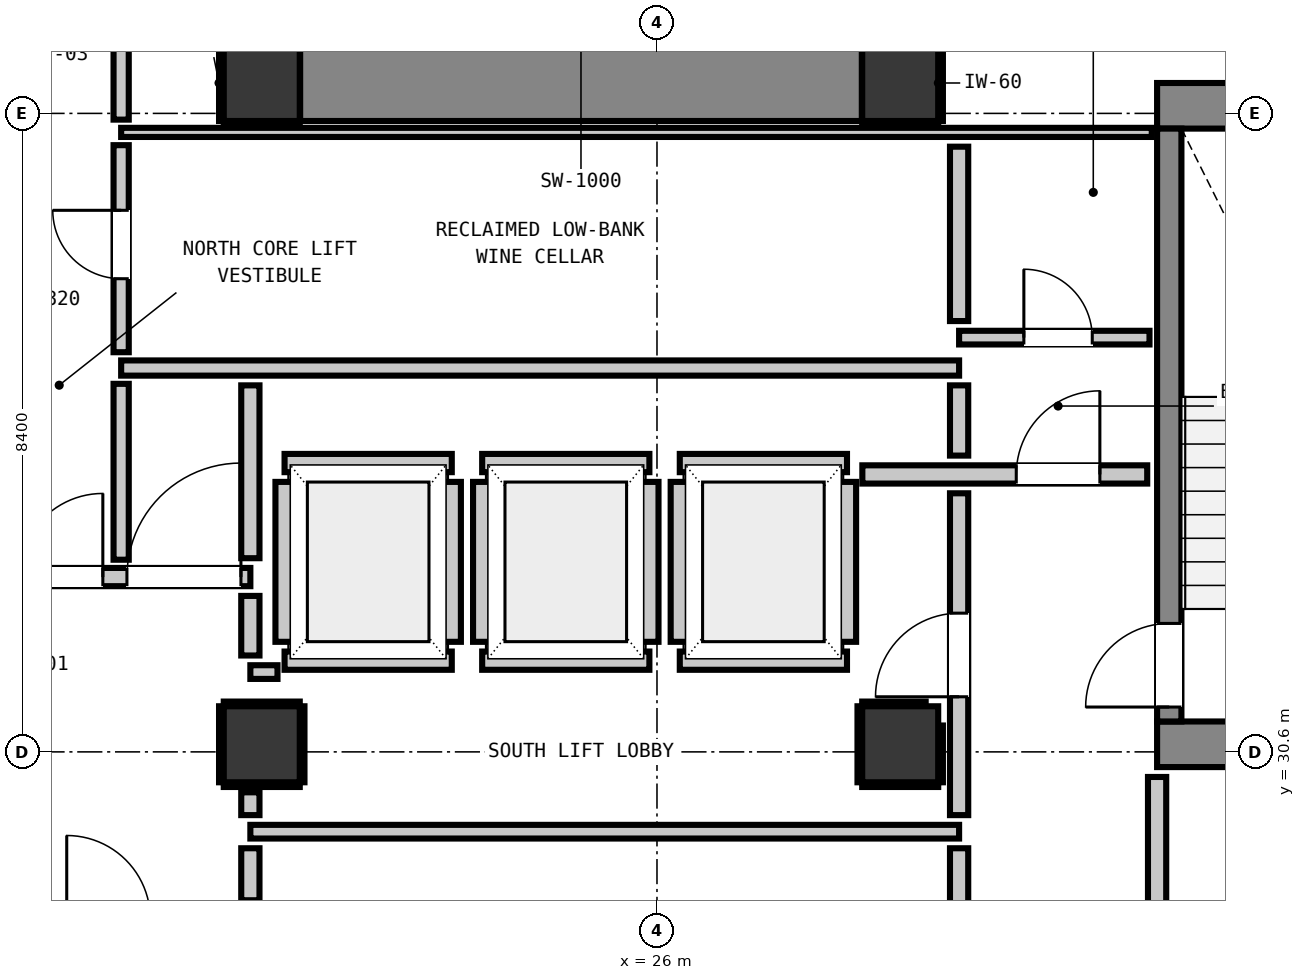
"""IFC4 building model, lengths in metres.
Left out: names, types, materials, properties, quantities, classifications, styles, units other than length and angle.
Written with IfcOpenShell. Run it as: python <this file> out.ifc"""

import sys

from ifc_helpers import new_model, si_unit, direction, frame, frame_2d, origin, origin_2d, place, context, subcontext, project, spatial, rectangle, extrude, element, fill, save


model = new_model("IFC4")
c1 = context("Model", 3, precision=1e-05, world=origin(), true_north=direction((0.0, 1.0)))
c2 = subcontext(c1, "Body", "Model", "MODEL_VIEW")
j1 = project(units=[si_unit("LENGTHUNIT", "METRE"), si_unit("PLANEANGLEUNIT", "RADIAN")], contexts=[c1])
p1 = place(None, origin())
s1 = spatial("IfcSite", under=j1, at=p1, CompositionType="ELEMENT")
p2 = place(p1, origin())
s2 = spatial("IfcBuilding", under=s1, at=p2, CompositionType="ELEMENT")
p3 = place(p2, frame((0.0, 0.0, 92.8)))
s3 = spatial("IfcBuildingStorey", under=s2, at=p3, CompositionType="ELEMENT", Elevation=92.8)
for number, where, z_axis, x_axis in (
    (1, (20.8, 39.4, 0.0), (0.0, 0.0, 1.0), (1.0, 0.0, 0.0)),
    (2, (29.2, 39.4, 0.0), (0.0, 0.0, 1.0), (1.0, 0.0, 0.0)),
):
    element("IfcColumn", number, at=place(p3, frame(where, z_axis=z_axis, x_axis=x_axis)), inside=s3, PredefinedType="COLUMN", context=c2, shape_type="SweptSolid", body=[
        extrude(rectangle(XDim=1.0, YDim=1.0, at=origin_2d()), origin(), (0.0, 0.0, 1.0), 3.32),
    ])
p4 = place(p3, frame((32.58, 39.1, 0.0), z_axis=(0.0, 0.0, 1.0), x_axis=(1.0, 0.0, 0.0)))
e3 = element("IfcWall", 3, at=p4, inside=s3, PredefinedType="SHEAR", context=c2, shape_type="SweptSolid", body=[
    extrude(rectangle(XDim=4.08, YDim=0.6, at=frame_2d((2.04, 0.0))), origin(), (0.0, 0.0, 1.0), 3.32),
])
p5 = place(p3, frame((32.58, 30.7, 0.0), z_axis=(0.0, 0.0, 1.0), x_axis=(1.0, 0.0, 0.0)))
e4 = element("IfcWall", 4, at=p5, inside=s3, PredefinedType="SHEAR", context=c2, shape_type="SweptSolid", body=[
    extrude(rectangle(XDim=3.415, YDim=0.6, at=frame_2d((1.708, 0.0))), origin(), (0.0, 0.0, 1.0), 3.32),
])
p6 = place(p3, frame((21.305, 39.4, 0.0), z_axis=(0.0, 0.0, 1.0), x_axis=(1.0, 0.0, 0.0)))
e5 = element("IfcWall", 5, at=p6, inside=s3, PredefinedType="SHEAR", context=c2, shape_type="SweptSolid", body=[
    extrude(rectangle(XDim=7.39, YDim=1.0, at=frame_2d((3.695, 0.0))), origin(), (0.0, 0.0, 1.0), 3.32),
])
p7 = place(p3, frame((32.74, 31.0, 0.0), z_axis=(0.0, 0.0, 1.0), x_axis=(0.0, 1.0, 0.0)))
e6 = element("IfcWall", 6, at=p7, inside=s3, PredefinedType="SHEAR", context=c2, shape_type="SweptSolid", body=[
    extrude(rectangle(XDim=7.8, YDim=0.32, at=frame_2d((3.9, 0.0))), origin(), (0.0, 0.0, 1.0), 3.32),
])
p8 = place(p7, frame((0.19, 0.0, 0.0)))
e7 = element("IfcOpeningElement", 7, at=p8, cuts=e6, PredefinedType="OPENING", context=c2, shape_type="SweptSolid", body=[
    extrude(rectangle(XDim=1.1, YDim=2.15, at=frame_2d((0.55, 1.075))), frame((0.0, 0.17, 0.0), z_axis=(0.0, -1.0, 0.0), x_axis=(1.0, 0.0, 0.0)), (0.0, 0.0, 1.0), 0.34),
])
for number, where, z_axis, x_axis in (
    (8, (20.8, 30.7, 0.0), (0.0, 0.0, 1.0), (1.0, 0.0, 0.0)),
    (9, (29.2, 30.7, 0.0), (0.0, 0.0, 1.0), (1.0, 0.0, 0.0)),
):
    element("IfcColumn", number, at=place(p3, frame(where, z_axis=z_axis, x_axis=x_axis)), inside=s3, PredefinedType="COLUMN", context=c2, shape_type="SweptSolid", body=[
        extrude(rectangle(XDim=1.0, YDim=1.0, at=origin_2d()), origin(), (0.0, 0.0, 1.0), 3.32),
    ])
for number, where, z_axis, x_axis in (
    (10, (21.1, 31.8, 0.0), (0.0, 0.0, 1.0), (1.0, 0.0, 0.0)),
    (11, (21.1, 34.4, 0.0), (0.0, 0.0, 1.0), (1.0, 0.0, 0.0)),
):
    element("IfcWall", number, at=place(p3, frame(where, z_axis=z_axis, x_axis=x_axis)), inside=s3, PredefinedType="PARTITIONING", context=c2, shape_type="SweptSolid", body=[
        extrude(rectangle(XDim=2.2, YDim=0.24, at=frame_2d((1.1, 0.0))), origin(), (0.0, 0.0, 1.0), 3.06),
    ])
p9 = place(p3, frame((21.1, 32.048, 0.0), z_axis=(0.0, 0.0, 1.0), x_axis=(0.0, 1.0, 0.0)))
e12 = element("IfcWall", 12, at=p9, inside=s3, PredefinedType="PARTITIONING", context=c2, shape_type="SweptSolid", body=[
    extrude(rectangle(XDim=2.104, YDim=0.24, at=frame_2d((1.052, 0.0))), origin(), (0.0, 0.0, 1.0), 2.295),
])
p10 = place(p3, frame((23.3, 32.048, 0.0), z_axis=(0.0, 0.0, 1.0), x_axis=(0.0, 1.0, 0.0)))
e13 = element("IfcWall", 13, at=p10, inside=s3, PredefinedType="PARTITIONING", context=c2, shape_type="SweptSolid", body=[
    extrude(rectangle(XDim=2.104, YDim=0.24, at=frame_2d((1.052, 0.0))), origin(), (0.0, 0.0, 1.0), 3.06),
])
for number, where, z_axis, x_axis in (
    (14, (23.7, 31.8, 0.0), (0.0, 0.0, 1.0), (1.0, 0.0, 0.0)),
    (15, (23.7, 34.4, 0.0), (0.0, 0.0, 1.0), (1.0, 0.0, 0.0)),
):
    element("IfcWall", number, at=place(p3, frame(where, z_axis=z_axis, x_axis=x_axis)), inside=s3, PredefinedType="PARTITIONING", context=c2, shape_type="SweptSolid", body=[
        extrude(rectangle(XDim=2.2, YDim=0.24, at=frame_2d((1.1, 0.0))), origin(), (0.0, 0.0, 1.0), 3.06),
    ])
for number, where, z_axis, x_axis in (
    (16, (23.7, 32.048, 0.0), (0.0, 0.0, 1.0), (0.0, 1.0, 0.0)),
    (17, (25.9, 32.048, 0.0), (0.0, 0.0, 1.0), (0.0, 1.0, 0.0)),
):
    element("IfcWall", number, at=place(p3, frame(where, z_axis=z_axis, x_axis=x_axis)), inside=s3, PredefinedType="PARTITIONING", context=c2, shape_type="SweptSolid", body=[
        extrude(rectangle(XDim=2.104, YDim=0.24, at=frame_2d((1.052, 0.0))), origin(), (0.0, 0.0, 1.0), 3.06),
    ])
for number, where, z_axis, x_axis in (
    (18, (26.3, 31.8, 0.0), (0.0, 0.0, 1.0), (1.0, 0.0, 0.0)),
    (19, (26.3, 34.4, 0.0), (0.0, 0.0, 1.0), (1.0, 0.0, 0.0)),
):
    element("IfcWall", number, at=place(p3, frame(where, z_axis=z_axis, x_axis=x_axis)), inside=s3, PredefinedType="PARTITIONING", context=c2, shape_type="SweptSolid", body=[
        extrude(rectangle(XDim=2.2, YDim=0.24, at=frame_2d((1.1, 0.0))), origin(), (0.0, 0.0, 1.0), 3.06),
    ])
for number, where, z_axis, x_axis in (
    (20, (26.3, 32.048, 0.0), (0.0, 0.0, 1.0), (0.0, 1.0, 0.0)),
    (21, (28.5, 32.048, 0.0), (0.0, 0.0, 1.0), (0.0, 1.0, 0.0)),
):
    element("IfcWall", number, at=place(p3, frame(where, z_axis=z_axis, x_axis=x_axis)), inside=s3, PredefinedType="PARTITIONING", context=c2, shape_type="SweptSolid", body=[
        extrude(rectangle(XDim=2.104, YDim=0.24, at=frame_2d((1.052, 0.0))), origin(), (0.0, 0.0, 1.0), 3.06),
    ])
p11 = place(p3, frame((17.45, 32.9, 0.0), z_axis=(0.0, 0.0, 1.0), x_axis=(1.0, 0.0, 0.0)))
e22 = element("IfcWall", 22, at=p11, inside=s3, PredefinedType="PARTITIONING", context=c2, shape_type="SweptSolid", body=[
    extrude(rectangle(XDim=3.2, YDim=0.24, at=frame_2d((1.6, 0.0))), origin(), (0.0, 0.0, 1.0), 3.06),
])
p12 = place(p11, frame((0.159, 0.0, 0.0)))
e23 = element("IfcOpeningElement", 23, at=p12, cuts=e22, PredefinedType="OPENING", context=c2, shape_type="SweptSolid", body=[
    extrude(rectangle(XDim=1.1, YDim=2.15, at=frame_2d((0.55, 1.075))), frame((0.0, 0.13, 0.0), z_axis=(0.0, -1.0, 0.0), x_axis=(1.0, 0.0, 0.0)), (0.0, 0.0, 1.0), 0.26),
])
p13 = place(p11, frame((1.576, 0.0, 0.0)))
e24 = element("IfcOpeningElement", 24, at=p13, cuts=e22, PredefinedType="OPENING", context=c2, shape_type="SweptSolid", body=[
    extrude(rectangle(XDim=1.5, YDim=2.15, at=frame_2d((0.75, 1.075))), frame((0.0, 0.13, 0.0), z_axis=(0.0, -1.0, 0.0), x_axis=(1.0, 0.0, 0.0)), (0.0, 0.0, 1.0), 0.26),
])
p14 = place(p3, frame((28.702, 34.25, 0.0), z_axis=(0.0, 0.0, 1.0), x_axis=(1.0, 0.0, 0.0)))
e25 = element("IfcWall", 25, at=p14, inside=s3, PredefinedType="PARTITIONING", context=c2, shape_type="SweptSolid", body=[
    extrude(rectangle(XDim=3.748, YDim=0.24, at=frame_2d((1.874, 0.0))), origin(), (0.0, 0.0, 1.0), 3.06),
])
p15 = place(p14, frame((2.025, 0.0, 0.0)))
e26 = element("IfcOpeningElement", 26, at=p15, cuts=e25, PredefinedType="OPENING", context=c2, shape_type="SweptSolid", body=[
    extrude(rectangle(XDim=1.1, YDim=2.15, at=frame_2d((0.55, 1.075))), frame((0.0, 0.13, 0.0), z_axis=(0.0, -1.0, 0.0), x_axis=(1.0, 0.0, 0.0)), (0.0, 0.0, 1.0), 0.26),
])
p16 = place(p3, frame((18.95, 35.65, 0.0), z_axis=(0.0, 0.0, 1.0), x_axis=(1.0, 0.0, 0.0)))
e27 = element("IfcWall", 27, at=p16, inside=s3, PredefinedType="PARTITIONING", context=c2, shape_type="SweptSolid", body=[
    extrude(rectangle(XDim=11.025, YDim=0.2, at=frame_2d((5.513, 0.0))), origin(), (0.0, 0.0, 1.0), 3.06),
])
p17 = place(p3, frame((20.65, 29.55, 0.0), z_axis=(0.0, 0.0, 1.0), x_axis=(1.0, 0.0, 0.0)))
e28 = element("IfcWall", 28, at=p17, inside=s3, PredefinedType="PARTITIONING", context=c2, shape_type="SweptSolid", body=[
    extrude(rectangle(XDim=9.325, YDim=0.18, at=frame_2d((4.663, 0.0))), origin(), (0.0, 0.0, 1.0), 3.06),
])
p18 = place(p3, frame((20.65, 31.65, 0.0), z_axis=(0.0, 0.0, 1.0), x_axis=(1.0, 0.0, 0.0)))
e29 = element("IfcWall", 29, at=p18, inside=s3, PredefinedType="PARTITIONING", context=c2, shape_type="SweptSolid", body=[
    extrude(rectangle(XDim=0.357, YDim=0.18, at=frame_2d((0.179, 0.0))), origin(), (0.0, 0.0, 1.0), 3.06),
])
p19 = place(p3, frame((29.975, 36.05, 0.0), z_axis=(0.0, 0.0, 1.0), x_axis=(1.0, 0.0, 0.0)))
e30 = element("IfcWall", 30, at=p19, inside=s3, PredefinedType="PARTITIONING", context=c2, shape_type="SweptSolid", body=[
    extrude(rectangle(XDim=2.505, YDim=0.18, at=frame_2d((1.252, 0.0))), origin(), (0.0, 0.0, 1.0), 3.06),
])
p20 = place(p19, frame((0.852, 0.0, 0.0)))
e31 = element("IfcOpeningElement", 31, at=p20, cuts=e30, PredefinedType="OPENING", context=c2, shape_type="SweptSolid", body=[
    extrude(rectangle(XDim=0.9, YDim=2.1, at=frame_2d((0.45, 1.05))), frame((0.0, 0.1, 0.0), z_axis=(0.0, -1.0, 0.0), x_axis=(1.0, 0.0, 0.0)), (0.0, 0.0, 1.0), 0.2),
])
p21 = place(p3, frame((18.95, 38.75, 0.0), z_axis=(0.0, 0.0, 1.0), x_axis=(1.0, 0.0, 0.0)))
e32 = element("IfcWall", 32, at=p21, inside=s3, PredefinedType="PARTITIONING", context=c2, shape_type="SweptSolid", body=[
    extrude(rectangle(XDim=13.56, YDim=0.12, at=frame_2d((6.78, 0.0))), origin(), (0.0, 0.0, 1.0), 3.06),
])
p22 = place(p3, frame((20.65, 28.648, 0.0), z_axis=(0.0, 0.0, 1.0), x_axis=(0.0, 1.0, 0.0)))
e33 = element("IfcWall", 33, at=p22, inside=s3, PredefinedType="PARTITIONING", context=c2, shape_type="SweptSolid", body=[
    extrude(rectangle(XDim=0.684, YDim=0.24, at=frame_2d((0.342, 0.0))), origin(), (0.0, 0.0, 1.0), 2.295),
])
p23 = place(p3, frame((20.65, 29.768, 0.0), z_axis=(0.0, 0.0, 1.0), x_axis=(0.0, 1.0, 0.0)))
e34 = element("IfcWall", 34, at=p23, inside=s3, PredefinedType="PARTITIONING", context=c2, shape_type="SweptSolid", body=[
    extrude(rectangle(XDim=0.3, YDim=0.24, at=frame_2d((0.15, 0.0))), origin(), (0.0, 0.0, 1.0), 2.295),
])
p24 = place(p3, frame((20.65, 31.868, 0.0), z_axis=(0.0, 0.0, 1.0), x_axis=(0.0, 1.0, 0.0)))
e35 = element("IfcWall", 35, at=p24, inside=s3, PredefinedType="PARTITIONING", context=c2, shape_type="SweptSolid", body=[
    extrude(rectangle(XDim=0.784, YDim=0.24, at=frame_2d((0.392, 0.0))), origin(), (0.0, 0.0, 1.0), 2.295),
])
p25 = place(p3, frame((20.65, 33.148, 0.0), z_axis=(0.0, 0.0, 1.0), x_axis=(0.0, 1.0, 0.0)))
e36 = element("IfcWall", 36, at=p25, inside=s3, PredefinedType="PARTITIONING", context=c2, shape_type="SweptSolid", body=[
    extrude(rectangle(XDim=2.274, YDim=0.24, at=frame_2d((1.137, 0.0))), origin(), (0.0, 0.0, 1.0), 2.295),
])
p26 = place(p3, frame((29.975, 25.648, 0.0), z_axis=(0.0, 0.0, 1.0), x_axis=(0.0, 1.0, 0.0)))
e37 = element("IfcWall", 37, at=p26, inside=s3, PredefinedType="PARTITIONING", context=c2, shape_type="SweptSolid", body=[
    extrude(rectangle(XDim=3.684, YDim=0.24, at=frame_2d((1.842, 0.0))), origin(), (0.0, 0.0, 1.0), 3.06),
])
p27 = place(p3, frame((29.975, 29.768, 0.0), z_axis=(0.0, 0.0, 1.0), x_axis=(0.0, 1.0, 0.0)))
e38 = element("IfcWall", 38, at=p27, inside=s3, PredefinedType="PARTITIONING", context=c2, shape_type="SweptSolid", body=[
    extrude(rectangle(XDim=4.234, YDim=0.24, at=frame_2d((2.117, 0.0))), origin(), (0.0, 0.0, 1.0), 3.06),
])
p28 = place(p27, frame((1.557, 0.0, 0.0)))
e39 = element("IfcOpeningElement", 39, at=p28, cuts=e38, PredefinedType="OPENING", context=c2, shape_type="SweptSolid", body=[
    extrude(rectangle(XDim=1.1, YDim=2.15, at=frame_2d((0.55, 1.075))), frame((0.0, 0.13, 0.0), z_axis=(0.0, -1.0, 0.0), x_axis=(1.0, 0.0, 0.0)), (0.0, 0.0, 1.0), 0.26),
])
p29 = place(p3, frame((29.975, 34.498, 0.0), z_axis=(0.0, 0.0, 1.0), x_axis=(0.0, 1.0, 0.0)))
e40 = element("IfcWall", 40, at=p29, inside=s3, PredefinedType="PARTITIONING", context=c2, shape_type="SweptSolid", body=[
    extrude(rectangle(XDim=0.924, YDim=0.24, at=frame_2d((0.462, 0.0))), origin(), (0.0, 0.0, 1.0), 3.06),
])
p30 = place(p3, frame((29.975, 36.268, 0.0), z_axis=(0.0, 0.0, 1.0), x_axis=(0.0, 1.0, 0.0)))
e41 = element("IfcWall", 41, at=p30, inside=s3, PredefinedType="PARTITIONING", context=c2, shape_type="SweptSolid", body=[
    extrude(rectangle(XDim=2.294, YDim=0.24, at=frame_2d((1.147, 0.0))), origin(), (0.0, 0.0, 1.0), 3.06),
])
p31 = place(p3, frame((32.58, 25.648, 0.0), z_axis=(0.0, 0.0, 1.0), x_axis=(0.0, 1.0, 0.0)))
e42 = element("IfcWall", 42, at=p31, inside=s3, PredefinedType="PARTITIONING", context=c2, shape_type="SweptSolid", body=[
    extrude(rectangle(XDim=4.622, YDim=0.24, at=frame_2d((2.311, 0.0))), origin(), (0.0, 0.0, 1.0), 3.06),
])
p32 = place(p3, frame((18.95, 33.128, 0.0), z_axis=(0.0, 0.0, 1.0), x_axis=(0.0, 1.0, 0.0)))
e43 = element("IfcWall", 43, at=p32, inside=s3, PredefinedType="PARTITIONING", context=c2, shape_type="SweptSolid", body=[
    extrude(rectangle(XDim=2.314, YDim=0.2, at=frame_2d((1.157, 0.0))), origin(), (0.0, 0.0, 1.0), 3.06),
])
p33 = place(p3, frame((18.95, 35.858, 0.0), z_axis=(0.0, 0.0, 1.0), x_axis=(0.0, 1.0, 0.0)))
e44 = element("IfcWall", 44, at=p33, inside=s3, PredefinedType="PARTITIONING", context=c2, shape_type="SweptSolid", body=[
    extrude(rectangle(XDim=2.724, YDim=0.2, at=frame_2d((1.362, 0.0))), origin(), (0.0, 0.0, 1.0), 3.06),
])
p34 = place(p33, frame((0.967, 0.0, 0.0)))
e45 = element("IfcOpeningElement", 45, at=p34, cuts=e44, PredefinedType="OPENING", context=c2, shape_type="SweptSolid", body=[
    extrude(rectangle(XDim=0.9, YDim=2.1, at=frame_2d((0.45, 1.05))), frame((0.0, 0.11, 0.0), z_axis=(0.0, -1.0, 0.0), x_axis=(1.0, 0.0, 0.0)), (0.0, 0.0, 1.0), 0.22),
])
p35 = place(p3, frame((18.95, 38.918, 0.0), z_axis=(0.0, 0.0, 1.0), x_axis=(0.0, 1.0, 0.0)))
e46 = element("IfcWall", 46, at=p35, inside=s3, PredefinedType="PARTITIONING", context=c2, shape_type="SweptSolid", body=[
    extrude(rectangle(XDim=1.134, YDim=0.2, at=frame_2d((0.567, 0.0))), origin(), (0.0, 0.0, 1.0), 3.06),
])
for number, where, z_axis, x_axis in (
    (47, (20.3, 38.868, 0.0), (0.0, 0.0, 1.0), (1.0, 0.0, 0.0)),
    (48, (20.268, 38.9, 0.0), (0.0, 0.0, 1.0), (0.0, 1.0, 0.0)),
    (49, (28.7, 38.868, 0.0), (0.0, 0.0, 1.0), (1.0, 0.0, 0.0)),
    (50, (29.732, 38.9, 0.0), (0.0, 0.0, 1.0), (0.0, 1.0, 0.0)),
    (51, (20.3, 30.168, 0.0), (0.0, 0.0, 1.0), (1.0, 0.0, 0.0)),
    (52, (20.3, 31.232, 0.0), (0.0, 0.0, 1.0), (1.0, 0.0, 0.0)),
    (53, (20.268, 30.2, 0.0), (0.0, 0.0, 1.0), (0.0, 1.0, 0.0)),
    (54, (21.332, 30.2, 0.0), (0.0, 0.0, 1.0), (0.0, 1.0, 0.0)),
    (55, (28.7, 30.168, 0.0), (0.0, 0.0, 1.0), (1.0, 0.0, 0.0)),
):
    element("IfcWall", number, at=place(p3, frame(where, z_axis=z_axis, x_axis=x_axis)), inside=s3, PredefinedType="PARTITIONING", context=c2, shape_type="SweptSolid", body=[
        extrude(rectangle(XDim=1.0, YDim=0.06, at=frame_2d((0.5, 0.0))), origin(), (0.0, 0.0, 1.0), 1.45),
    ])
p36 = place(p3, frame((28.7, 31.232, 0.0), z_axis=(0.0, 0.0, 1.0), x_axis=(1.0, 0.0, 0.0)))
e56 = element("IfcWall", 56, at=p36, inside=s3, PredefinedType="PARTITIONING", context=c2, shape_type="SweptSolid", body=[
    extrude(rectangle(XDim=0.835, YDim=0.06, at=frame_2d((0.417, 0.0))), origin(), (0.0, 0.0, 1.0), 1.45),
])
p37 = place(p3, frame((28.668, 30.2, 0.0), z_axis=(0.0, 0.0, 1.0), x_axis=(0.0, 1.0, 0.0)))
e57 = element("IfcWall", 57, at=p37, inside=s3, PredefinedType="PARTITIONING", context=c2, shape_type="SweptSolid", body=[
    extrude(rectangle(XDim=1.0, YDim=0.06, at=frame_2d((0.5, 0.0))), origin(), (0.0, 0.0, 1.0), 1.45),
])
p38 = place(p3, frame((29.732, 30.2, 0.0), z_axis=(0.0, 0.0, 1.0), x_axis=(0.0, 1.0, 0.0)))
e58 = element("IfcWall", 58, at=p38, inside=s3, PredefinedType="PARTITIONING", context=c2, shape_type="SweptSolid", body=[
    extrude(rectangle(XDim=0.747, YDim=0.06, at=frame_2d((0.374, 0.0))), origin(), (0.0, 0.0, 1.0), 1.45),
])
p39 = place(p8, origin())
e59 = element("IfcDoor", 59, at=p39, inside=s3, OperationType="SINGLE_SWING_LEFT", PredefinedType="DOOR", context=c2, shape_type="SweptSolid", body=[
    extrude(rectangle(XDim=1.1, YDim=2.15, at=frame_2d((0.55, 1.075))), frame((0.0, 0.025, 0.0), z_axis=(0.0, -1.0, 0.0), x_axis=(1.0, 0.0, 0.0)), (0.0, 0.0, 1.0), 0.05),
])
fill(e7, e59)
p40 = place(p12, origin())
e60 = element("IfcDoor", 60, at=p40, inside=s3, OperationType="SINGLE_SWING_RIGHT", PredefinedType="DOOR", context=c2, shape_type="SweptSolid", body=[
    extrude(rectangle(XDim=1.1, YDim=2.15, at=frame_2d((0.55, 1.075))), frame((0.0, 0.025, 0.0), z_axis=(0.0, -1.0, 0.0), x_axis=(1.0, 0.0, 0.0)), (0.0, 0.0, 1.0), 0.05),
])
fill(e23, e60)
p41 = place(p28, origin())
e61 = element("IfcDoor", 61, at=p41, inside=s3, OperationType="SINGLE_SWING_LEFT", PredefinedType="DOOR", context=c2, shape_type="SweptSolid", body=[
    extrude(rectangle(XDim=1.1, YDim=2.15, at=frame_2d((0.55, 1.075))), frame((0.0, 0.025, 0.0), z_axis=(0.0, -1.0, 0.0), x_axis=(1.0, 0.0, 0.0)), (0.0, 0.0, 1.0), 0.05),
])
fill(e39, e61)
p42 = place(p15, origin())
e62 = element("IfcDoor", 62, at=p42, inside=s3, OperationType="SINGLE_SWING_RIGHT", PredefinedType="DOOR", context=c2, shape_type="SweptSolid", body=[
    extrude(rectangle(XDim=1.1, YDim=2.15, at=frame_2d((0.55, 1.075))), frame((0.0, 0.025, 0.0), z_axis=(0.0, -1.0, 0.0), x_axis=(1.0, 0.0, 0.0)), (0.0, 0.0, 1.0), 0.05),
])
fill(e26, e62)
p43 = place(p13, origin())
e63 = element("IfcDoor", 63, at=p43, inside=s3, OperationType="SINGLE_SWING_RIGHT", PredefinedType="DOOR", context=c2, shape_type="SweptSolid", body=[
    extrude(rectangle(XDim=1.5, YDim=2.15, at=frame_2d((0.75, 1.075))), frame((0.0, 0.025, 0.0), z_axis=(0.0, -1.0, 0.0), x_axis=(1.0, 0.0, 0.0)), (0.0, 0.0, 1.0), 0.05),
])
fill(e24, e63)
p44 = place(p20, origin())
e64 = element("IfcDoor", 64, at=p44, inside=s3, OperationType="SINGLE_SWING_LEFT", PredefinedType="DOOR", context=c2, shape_type="SweptSolid", body=[
    extrude(rectangle(XDim=0.9, YDim=2.1, at=frame_2d((0.45, 1.05))), frame((0.0, 0.025, 0.0), z_axis=(0.0, -1.0, 0.0), x_axis=(1.0, 0.0, 0.0)), (0.0, 0.0, 1.0), 0.05),
])
fill(e31, e64)
p45 = place(p34, origin())
e65 = element("IfcDoor", 65, at=p45, inside=s3, OperationType="SINGLE_SWING_RIGHT", PredefinedType="DOOR", context=c2, shape_type="SweptSolid", body=[
    extrude(rectangle(XDim=0.9, YDim=2.1, at=frame_2d((0.45, 1.05))), frame((0.0, 0.025, 0.0), z_axis=(0.0, -1.0, 0.0), x_axis=(1.0, 0.0, 0.0)), (0.0, 0.0, 1.0), 0.05),
])
fill(e45, e65)
save(model, sys.argv[1])
